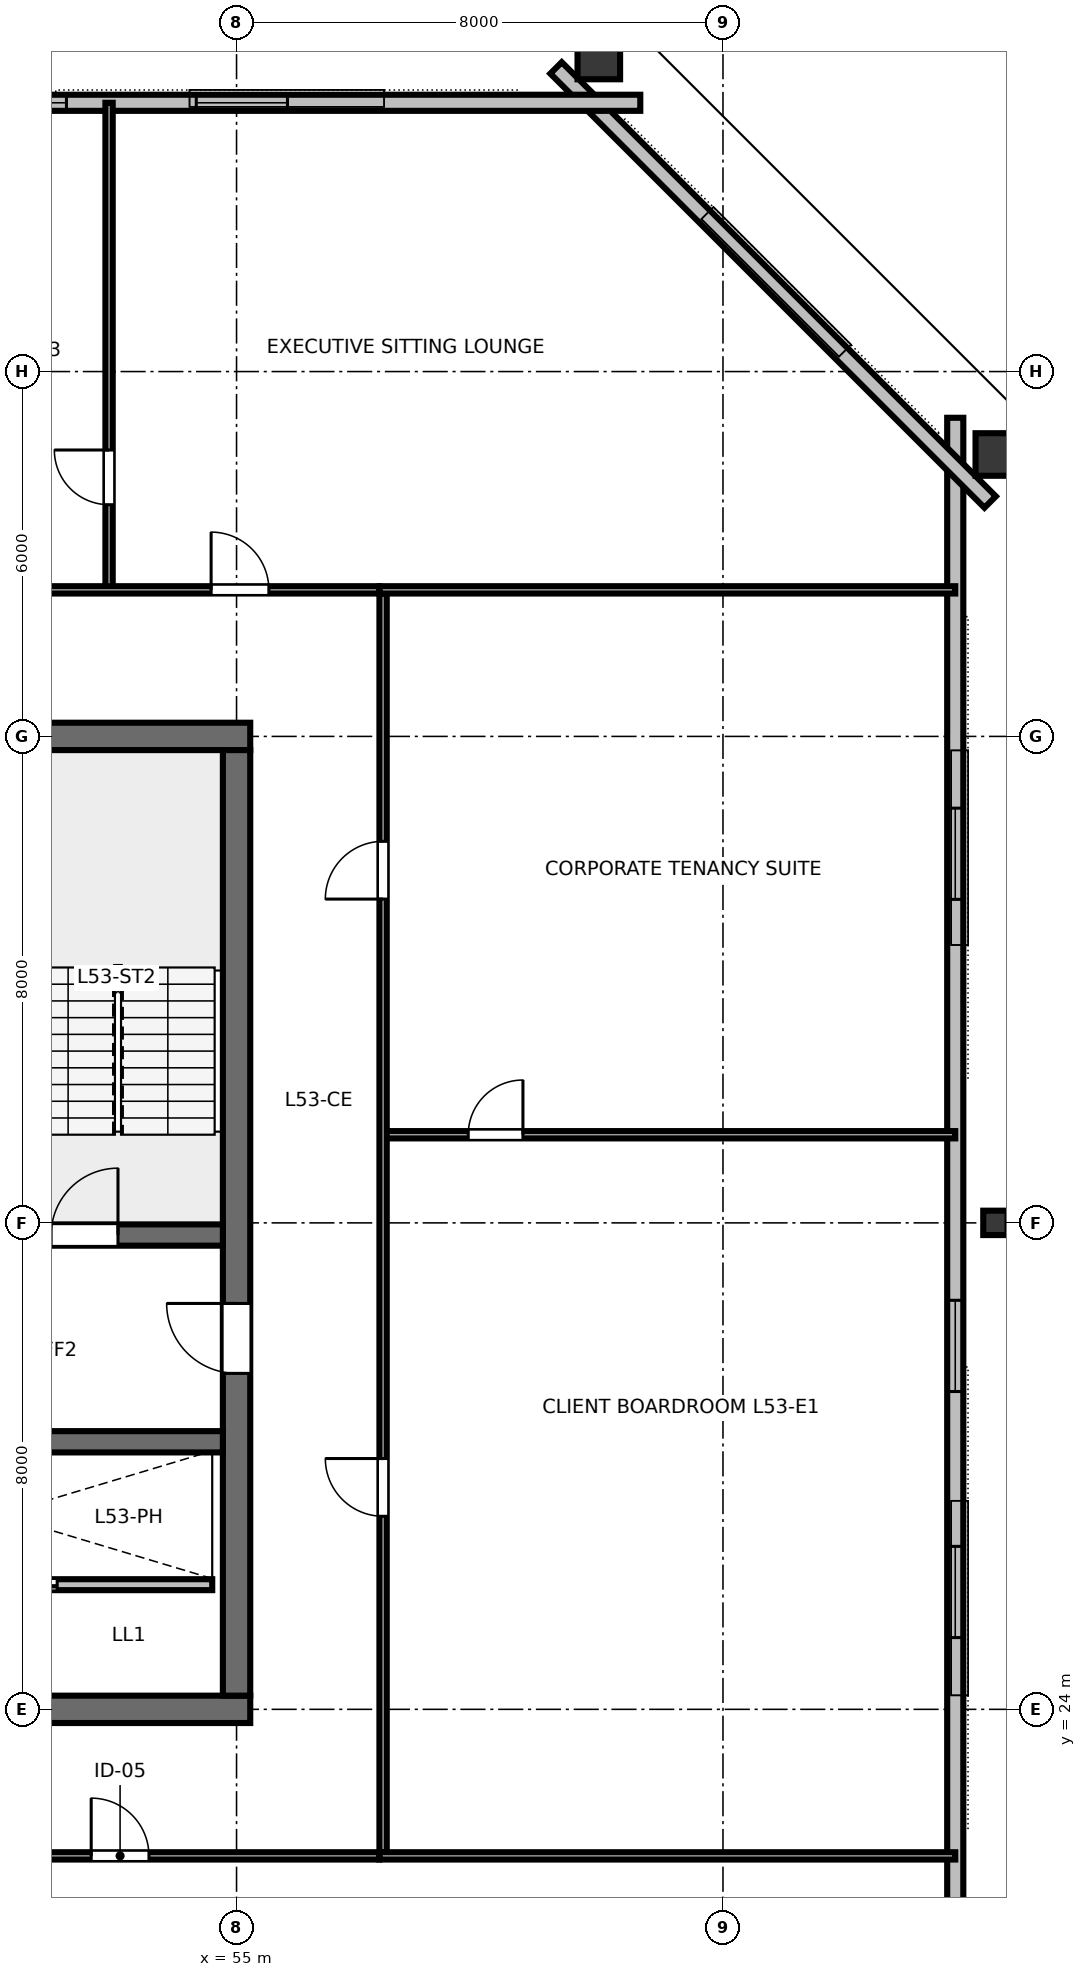
"""IFC4 building model, lengths in metres.
Left out: names, types, materials, properties, quantities, classifications, styles, units other than length and angle.
Written with IfcOpenShell. Run it as: python <this file> out.ifc"""

import sys

from ifc_helpers import new_model, si_unit, direction, frame, frame_2d, origin, origin_2d, place, context, subcontext, project, spatial, rectangle, hollow_rectangle, i_section, extrude, element, fill, save


model = new_model("IFC4")
c1 = context("Model", 3, precision=1e-05, world=origin(), true_north=direction((0.0, 1.0)))
c2 = subcontext(c1, "Body", "Model", "MODEL_VIEW")
j1 = project(units=[si_unit("LENGTHUNIT", "METRE"), si_unit("PLANEANGLEUNIT", "RADIAN")], contexts=[c1])
p1 = place(None, origin())
s1 = spatial("IfcSite", under=j1, at=p1, CompositionType="ELEMENT")
p2 = place(p1, origin())
s2 = spatial("IfcBuilding", under=s1, at=p2, CompositionType="ELEMENT")
p3 = place(p2, frame((0.0, 0.0, 202.2)))
s3 = spatial("IfcBuildingStorey", under=s2, at=p3, CompositionType="ELEMENT", Elevation=202.2)
p4 = place(p3, frame((36.775, 24.0, 0.0), z_axis=(0.0, 0.0, 1.0), x_axis=(1.0, 0.0, 0.0)))
e1 = element("IfcWall", 1, at=p4, inside=s3, PredefinedType="SHEAR", context=c2, shape_type="SweptSolid", body=[
    extrude(rectangle(XDim=18.45, YDim=0.45, at=frame_2d((9.225, 0.0))), origin(), (0.0, 0.0, 1.0), 3.36),
])
p5 = place(p4, frame((13.425, 0.0, 0.0)))
e2 = element("IfcOpeningElement", 2, at=p5, cuts=e1, PredefinedType="OPENING", context=c2, shape_type="SweptSolid", body=[
    extrude(rectangle(XDim=1.6, YDim=2.15, at=frame_2d((0.8, 1.075))), frame((0.0, 0.235, 0.0), z_axis=(0.0, -1.0, 0.0), x_axis=(1.0, 0.0, 0.0)), (0.0, 0.0, 1.0), 0.47),
])
p6 = place(p3, frame((36.775, 40.0, 0.0), z_axis=(0.0, 0.0, 1.0), x_axis=(1.0, 0.0, 0.0)))
e3 = element("IfcWall", 3, at=p6, inside=s3, PredefinedType="SHEAR", context=c2, shape_type="SweptSolid", body=[
    extrude(rectangle(XDim=18.45, YDim=0.45, at=frame_2d((9.225, 0.0))), origin(), (0.0, 0.0, 1.0), 3.36),
])
p7 = place(p6, frame((10.525, 0.0, 0.0)))
e4 = element("IfcOpeningElement", 4, at=p7, cuts=e3, PredefinedType="OPENING", context=c2, shape_type="SweptSolid", body=[
    extrude(rectangle(XDim=1.0, YDim=2.15, at=frame_2d((0.5, 1.075))), frame((0.0, 0.235, 0.0), z_axis=(0.0, -1.0, 0.0), x_axis=(1.0, 0.0, 0.0)), (0.0, 0.0, 1.0), 0.47),
])
p8 = place(p3, frame((55.0, 24.225, 0.0), z_axis=(0.0, 0.0, 1.0), x_axis=(0.0, 1.0, 0.0)))
e5 = element("IfcWall", 5, at=p8, inside=s3, PredefinedType="SHEAR", context=c2, shape_type="SweptSolid", body=[
    extrude(rectangle(XDim=15.55, YDim=0.45, at=frame_2d((7.775, 0.0))), origin(), (0.0, 0.0, 1.0), 3.36),
])
p9 = place(p8, frame((5.3, 0.0, 0.0)))
e6 = element("IfcOpeningElement", 6, at=p9, cuts=e5, PredefinedType="OPENING", context=c2, shape_type="SweptSolid", body=[
    extrude(rectangle(XDim=1.15, YDim=2.15, at=frame_2d((0.575, 1.075))), frame((0.0, 0.235, 0.0), z_axis=(0.0, -1.0, 0.0), x_axis=(1.0, 0.0, 0.0)), (0.0, 0.0, 1.0), 0.47),
])
p10 = place(p3, frame((37.225, 31.8, 0.0), z_axis=(0.0, 0.0, 1.0), x_axis=(1.0, 0.0, 0.0)))
e7 = element("IfcWall", 7, at=p10, inside=s3, PredefinedType="SHEAR", context=c2, shape_type="SweptSolid", body=[
    extrude(rectangle(XDim=17.55, YDim=0.35, at=frame_2d((8.775, 0.0))), origin(), (0.0, 0.0, 1.0), 3.36),
])
p11 = place(p10, frame((0.825, 0.0, 0.0)))
e8 = element("IfcOpeningElement", 8, at=p11, cuts=e7, PredefinedType="OPENING", context=c2, shape_type="SweptSolid", body=[
    extrude(rectangle(XDim=1.1, YDim=2.15, at=frame_2d((0.55, 1.075))), frame((0.0, 0.185, 0.0), z_axis=(0.0, -1.0, 0.0), x_axis=(1.0, 0.0, 0.0)), (0.0, 0.0, 1.0), 0.37),
])
p12 = place(p10, frame((14.725, 0.0, 0.0)))
e9 = element("IfcOpeningElement", 9, at=p12, cuts=e7, PredefinedType="OPENING", context=c2, shape_type="SweptSolid", body=[
    extrude(rectangle(XDim=1.1, YDim=2.15, at=frame_2d((0.55, 1.075))), frame((0.0, 0.185, 0.0), z_axis=(0.0, -1.0, 0.0), x_axis=(1.0, 0.0, 0.0)), (0.0, 0.0, 1.0), 0.37),
])
p13 = place(p3, frame((37.225, 28.4, 0.0), z_axis=(0.0, 0.0, 1.0), x_axis=(1.0, 0.0, 0.0)))
e10 = element("IfcWall", 10, at=p13, inside=s3, PredefinedType="SHEAR", context=c2, shape_type="SweptSolid", body=[
    extrude(rectangle(XDim=17.55, YDim=0.35, at=frame_2d((8.775, 0.0))), origin(), (0.0, 0.0, 1.0), 3.36),
])
p14 = place(p3, frame((67.48, 32.0, 0.0), z_axis=(0.0, 0.0, 1.0), x_axis=(0.0, 1.0, 0.0)))
e11 = element("IfcColumn", 11, at=p14, inside=s3, PredefinedType="COLUMN", context=c2, shape_type="SweptSolid", body=[
    extrude(i_section(OverallWidth=0.401, OverallDepth=0.399, WebThickness=0.025, FlangeThickness=0.04, FilletRadius=0.025, at=origin_2d()), origin(), (0.0, 0.0, 1.0), 3.373),
])
for number, where, z_axis, x_axis in (
    (12, (67.579, 44.636, 0.0), (0.0, 0.0, 1.0), (0.0, 1.0, 0.0)),
    (13, (60.958, 51.232, 0.0), (0.0, 0.0, 1.0), (1.0, 0.0, 0.0)),
):
    element("IfcColumn", number, at=place(p3, frame(where, z_axis=z_axis, x_axis=x_axis)), inside=s3, PredefinedType="COLUMN", context=c2, shape_type="SweptSolid", body=[
        extrude(hollow_rectangle(XDim=0.7, YDim=0.85, WallThickness=0.04, at=origin_2d()), origin(), (0.0, 0.0, 1.0), 3.373),
    ])
p15 = place(p3, frame((66.82, 18.76, 0.0), z_axis=(0.0, 0.0, 1.0), x_axis=(0.0, 1.0, 0.0)))
e14 = element("IfcWall", 14, at=p15, inside=s3, PredefinedType="STANDARD", context=c2, shape_type="SweptSolid", body=[
    extrude(rectangle(XDim=26.48, YDim=0.265, at=frame_2d((13.24, 0.0))), origin(), (0.0, 0.0, 1.0), 3.375),
])
p16 = place(p15, frame((6.42, 0.0, 0.85)))
e15 = element("IfcOpeningElement", 15, at=p16, cuts=e14, PredefinedType="OPENING", context=c2, shape_type="SweptSolid", body=[
    extrude(rectangle(XDim=1.5, YDim=1.85, at=frame_2d((0.75, 0.925))), frame((0.0, 0.142, 0.0), z_axis=(0.0, -1.0, 0.0), x_axis=(1.0, 0.0, 0.0)), (0.0, 0.0, 1.0), 0.285),
])
p17 = place(p15, frame((10.467, 0.0, 0.85)))
e16 = element("IfcOpeningElement", 16, at=p17, cuts=e14, PredefinedType="OPENING", context=c2, shape_type="SweptSolid", body=[
    extrude(rectangle(XDim=1.5, YDim=1.85, at=frame_2d((0.75, 0.925))), frame((0.0, 0.142, 0.0), z_axis=(0.0, -1.0, 0.0), x_axis=(1.0, 0.0, 0.0)), (0.0, 0.0, 1.0), 0.285),
])
p18 = place(p15, frame((18.56, 0.0, 0.85)))
e17 = element("IfcOpeningElement", 17, at=p18, cuts=e14, PredefinedType="OPENING", context=c2, shape_type="SweptSolid", body=[
    extrude(rectangle(XDim=1.5, YDim=1.85, at=frame_2d((0.75, 0.925))), frame((0.0, 0.142, 0.0), z_axis=(0.0, -1.0, 0.0), x_axis=(1.0, 0.0, 0.0)), (0.0, 0.0, 1.0), 0.285),
])
p19 = place(p3, frame((67.394, 43.854, 0.0), z_axis=(0.0, 0.0, 1.0), x_axis=(-0.707106781187, 0.707106781187, 0.0)))
e18 = element("IfcWall", 18, at=p19, inside=s3, PredefinedType="STANDARD", context=c2, shape_type="SweptSolid", body=[
    extrude(rectangle(XDim=10.097, YDim=0.265, at=frame_2d((5.048, 0.0))), origin(), (0.0, 0.0, 1.0), 3.375),
])
p20 = place(p3, frame((61.64, 50.42, 0.0), z_axis=(0.0, 0.0, 1.0), x_axis=(-1.0, 0.0, 0.0)))
e19 = element("IfcWall", 19, at=p20, inside=s3, PredefinedType="STANDARD", context=c2, shape_type="SweptSolid", body=[
    extrude(rectangle(XDim=31.28, YDim=0.265, at=frame_2d((15.64, 0.0))), origin(), (0.0, 0.0, 1.0), 3.375),
])
p21 = place(p20, frame((5.802, 0.0, 0.85)))
e20 = element("IfcOpeningElement", 20, at=p21, cuts=e19, PredefinedType="OPENING", context=c2, shape_type="SweptSolid", body=[
    extrude(rectangle(XDim=1.5, YDim=1.85, at=frame_2d((0.75, 0.925))), frame((0.0, 0.142, 0.0), z_axis=(0.0, -1.0, 0.0), x_axis=(1.0, 0.0, 0.0)), (0.0, 0.0, 1.0), 0.285),
])
p22 = place(p20, frame((9.438, 0.0, 0.85)))
e21 = element("IfcOpeningElement", 21, at=p22, cuts=e19, PredefinedType="OPENING", context=c2, shape_type="SweptSolid", body=[
    extrude(rectangle(XDim=1.5, YDim=1.85, at=frame_2d((0.75, 0.925))), frame((0.0, 0.142, 0.0), z_axis=(0.0, -1.0, 0.0), x_axis=(1.0, 0.0, 0.0)), (0.0, 0.0, 1.0), 0.285),
])
p23 = place(p20, frame((13.073, 0.0, 0.85)))
e22 = element("IfcOpeningElement", 22, at=p23, cuts=e19, PredefinedType="OPENING", context=c2, shape_type="SweptSolid", body=[
    extrude(rectangle(XDim=1.5, YDim=1.85, at=frame_2d((0.75, 0.925))), frame((0.0, 0.142, 0.0), z_axis=(0.0, -1.0, 0.0), x_axis=(1.0, 0.0, 0.0)), (0.0, 0.0, 1.0), 0.285),
])
p24 = place(p20, frame((16.708, 0.0, 0.85)))
e23 = element("IfcOpeningElement", 23, at=p24, cuts=e19, PredefinedType="OPENING", context=c2, shape_type="SweptSolid", body=[
    extrude(rectangle(XDim=1.5, YDim=1.85, at=frame_2d((0.75, 0.925))), frame((0.0, 0.142, 0.0), z_axis=(0.0, -1.0, 0.0), x_axis=(1.0, 0.0, 0.0)), (0.0, 0.0, 1.0), 0.285),
])
p25 = place(p20, frame((23.978, 0.0, 0.85)))
e24 = element("IfcOpeningElement", 24, at=p25, cuts=e19, PredefinedType="OPENING", context=c2, shape_type="SweptSolid", body=[
    extrude(rectangle(XDim=1.5, YDim=1.85, at=frame_2d((0.75, 0.925))), frame((0.0, 0.142, 0.0), z_axis=(0.0, -1.0, 0.0), x_axis=(1.0, 0.0, 0.0)), (0.0, 0.0, 1.0), 0.285),
])
p26 = place(p3, frame((47.6, 26.05, 0.0), z_axis=(0.0, 0.0, 1.0), x_axis=(1.0, 0.0, 0.0)))
e25 = element("IfcWall", 25, at=p26, inside=s3, PredefinedType="PARTITIONING", context=c2, shape_type="SweptSolid", body=[
    extrude(rectangle(XDim=7.0, YDim=0.18, at=frame_2d((3.5, 0.0))), origin(), (0.0, 0.0, 1.0), 3.375),
])
p27 = place(p26, frame((1.2, 0.0, 0.0)))
e26 = element("IfcOpeningElement", 26, at=p27, cuts=e25, PredefinedType="OPENING", context=c2, shape_type="SweptSolid", body=[
    extrude(rectangle(XDim=1.05, YDim=2.15, at=frame_2d((0.525, 1.075))), frame((0.0, 0.1, 0.0), z_axis=(0.0, -1.0, 0.0), x_axis=(1.0, 0.0, 0.0)), (0.0, 0.0, 1.0), 0.2),
])
p28 = place(p26, frame((3.4, 0.0, 0.0)))
e27 = element("IfcOpeningElement", 27, at=p28, cuts=e25, PredefinedType="OPENING", context=c2, shape_type="SweptSolid", body=[
    extrude(rectangle(XDim=1.05, YDim=2.15, at=frame_2d((0.525, 1.075))), frame((0.0, 0.1, 0.0), z_axis=(0.0, -1.0, 0.0), x_axis=(1.0, 0.0, 0.0)), (0.0, 0.0, 1.0), 0.2),
])
p29 = place(p3, frame((47.02, 21.59, 0.0), z_axis=(0.0, 0.0, 1.0), x_axis=(1.0, 0.0, 0.0)))
e28 = element("IfcWall", 28, at=p29, inside=s3, PredefinedType="PARTITIONING", context=c2, shape_type="SweptSolid", body=[
    extrude(rectangle(XDim=10.33, YDim=0.12, at=frame_2d((5.165, 0.0))), origin(), (0.0, 0.0, 1.0), 2.655),
])
p30 = place(p29, frame((5.59, 0.0, 0.0)))
e29 = element("IfcOpeningElement", 29, at=p30, cuts=e28, PredefinedType="OPENING", context=c2, shape_type="SweptSolid", body=[
    extrude(rectangle(XDim=0.95, YDim=2.15, at=frame_2d((0.475, 1.075))), frame((0.0, 0.07, 0.0), z_axis=(0.0, -1.0, 0.0), x_axis=(1.0, 0.0, 0.0)), (0.0, 0.0, 1.0), 0.14),
])
p31 = place(p3, frame((52.903, 42.41, 0.0), z_axis=(0.0, 0.0, 1.0), x_axis=(0.0, 1.0, 0.0)))
e30 = element("IfcWall", 30, at=p31, inside=s3, PredefinedType="PARTITIONING", context=c2, shape_type="SweptSolid", body=[
    extrude(rectangle(XDim=8.01, YDim=0.12, at=frame_2d((4.005, 0.0))), origin(), (0.0, 0.0, 1.0), 2.655),
])
p32 = place(p31, frame((1.4, 0.0, 0.0)))
e31 = element("IfcOpeningElement", 31, at=p32, cuts=e30, PredefinedType="OPENING", context=c2, shape_type="SweptSolid", body=[
    extrude(rectangle(XDim=0.9, YDim=2.15, at=frame_2d((0.45, 1.075))), frame((0.0, 0.07, 0.0), z_axis=(0.0, -1.0, 0.0), x_axis=(1.0, 0.0, 0.0)), (0.0, 0.0, 1.0), 0.14),
])
p33 = place(p3, frame((47.02, 42.41, 0.0), z_axis=(0.0, 0.0, 1.0), x_axis=(1.0, 0.0, 0.0)))
e32 = element("IfcWall", 32, at=p33, inside=s3, PredefinedType="PARTITIONING", context=c2, shape_type="SweptSolid", body=[
    extrude(rectangle(XDim=10.33, YDim=0.12, at=frame_2d((5.165, 0.0))), origin(), (0.0, 0.0, 1.0), 2.655),
])
p34 = place(p33, frame((2.467, 0.0, 0.0)))
e33 = element("IfcOpeningElement", 33, at=p34, cuts=e32, PredefinedType="OPENING", context=c2, shape_type="SweptSolid", body=[
    extrude(rectangle(XDim=0.95, YDim=2.15, at=frame_2d((0.475, 1.075))), frame((0.0, 0.07, 0.0), z_axis=(0.0, -1.0, 0.0), x_axis=(1.0, 0.0, 0.0)), (0.0, 0.0, 1.0), 0.14),
])
p35 = place(p33, frame((7.562, 0.0, 0.0)))
e34 = element("IfcOpeningElement", 34, at=p35, cuts=e32, PredefinedType="OPENING", context=c2, shape_type="SweptSolid", body=[
    extrude(rectangle(XDim=0.95, YDim=2.15, at=frame_2d((0.475, 1.075))), frame((0.0, 0.07, 0.0), z_axis=(0.0, -1.0, 0.0), x_axis=(1.0, 0.0, 0.0)), (0.0, 0.0, 1.0), 0.14),
])
p36 = place(p3, frame((57.41, 33.449, 0.0), z_axis=(0.0, 0.0, 1.0), x_axis=(1.0, 0.0, 0.0)))
e35 = element("IfcWall", 35, at=p36, inside=s3, PredefinedType="PARTITIONING", context=c2, shape_type="SweptSolid", body=[
    extrude(rectangle(XDim=9.41, YDim=0.12, at=frame_2d((4.705, 0.0))), origin(), (0.0, 0.0, 1.0), 2.655),
])
p37 = place(p36, frame((1.4, 0.0, 0.0)))
e36 = element("IfcOpeningElement", 36, at=p37, cuts=e35, PredefinedType="OPENING", context=c2, shape_type="SweptSolid", body=[
    extrude(rectangle(XDim=0.9, YDim=2.15, at=frame_2d((0.45, 1.075))), frame((0.0, 0.07, 0.0), z_axis=(0.0, -1.0, 0.0), x_axis=(1.0, 0.0, 0.0)), (0.0, 0.0, 1.0), 0.14),
])
p38 = place(p3, frame((57.41, 21.65, 0.0), z_axis=(0.0, 0.0, 1.0), x_axis=(0.0, 1.0, 0.0)))
e37 = element("IfcWall", 37, at=p38, inside=s3, PredefinedType="PARTITIONING", context=c2, shape_type="SweptSolid", body=[
    extrude(rectangle(XDim=20.7, YDim=0.12, at=frame_2d((10.35, 0.0))), origin(), (0.0, 0.0, 1.0), 2.655),
])
p39 = place(p38, frame((5.525, 0.0, 0.0)))
e38 = element("IfcOpeningElement", 38, at=p39, cuts=e37, PredefinedType="OPENING", context=c2, shape_type="SweptSolid", body=[
    extrude(rectangle(XDim=0.95, YDim=2.15, at=frame_2d((0.475, 1.075))), frame((0.0, 0.07, 0.0), z_axis=(0.0, -1.0, 0.0), x_axis=(1.0, 0.0, 0.0)), (0.0, 0.0, 1.0), 0.14),
])
p40 = place(p38, frame((15.675, 0.0, 0.0)))
e39 = element("IfcOpeningElement", 39, at=p40, cuts=e37, PredefinedType="OPENING", context=c2, shape_type="SweptSolid", body=[
    extrude(rectangle(XDim=0.95, YDim=2.15, at=frame_2d((0.475, 1.075))), frame((0.0, 0.07, 0.0), z_axis=(0.0, -1.0, 0.0), x_axis=(1.0, 0.0, 0.0)), (0.0, 0.0, 1.0), 0.14),
])
for number, where, z_axis, x_axis in (
    (40, (57.35, 21.59, 0.0), (0.0, 0.0, 1.0), (1.0, 0.0, 0.0)),
    (41, (57.35, 42.41, 0.0), (0.0, 0.0, 1.0), (1.0, 0.0, 0.0)),
):
    element("IfcWall", number, at=place(p3, frame(where, z_axis=z_axis, x_axis=x_axis)), inside=s3, PredefinedType="PARTITIONING", context=c2, shape_type="SweptSolid", body=[
        extrude(rectangle(XDim=9.47, YDim=0.12, at=frame_2d((4.735, 0.0))), origin(), (0.0, 0.0, 1.0), 2.655),
    ])
p41 = place(p16, origin())
e42 = element("IfcWindow", 42, at=p41, inside=s3, PartitioningType="SINGLE_PANEL", PredefinedType="WINDOW", context=c2, shape_type="SweptSolid", body=[
    extrude(rectangle(XDim=1.5, YDim=1.85, at=frame_2d((0.75, 0.925))), frame((0.0, 0.03, 0.0), z_axis=(0.0, -1.0, 0.0), x_axis=(1.0, 0.0, 0.0)), (0.0, 0.0, 1.0), 0.06),
])
fill(e15, e42)
p42 = place(p17, origin())
e43 = element("IfcWindow", 43, at=p42, inside=s3, PartitioningType="SINGLE_PANEL", PredefinedType="WINDOW", context=c2, shape_type="SweptSolid", body=[
    extrude(rectangle(XDim=1.5, YDim=1.85, at=frame_2d((0.75, 0.925))), frame((0.0, 0.03, 0.0), z_axis=(0.0, -1.0, 0.0), x_axis=(1.0, 0.0, 0.0)), (0.0, 0.0, 1.0), 0.06),
])
fill(e16, e43)
p43 = place(p18, origin())
e44 = element("IfcWindow", 44, at=p43, inside=s3, PartitioningType="SINGLE_PANEL", PredefinedType="WINDOW", context=c2, shape_type="SweptSolid", body=[
    extrude(rectangle(XDim=1.5, YDim=1.85, at=frame_2d((0.75, 0.925))), frame((0.0, 0.03, 0.0), z_axis=(0.0, -1.0, 0.0), x_axis=(1.0, 0.0, 0.0)), (0.0, 0.0, 1.0), 0.06),
])
fill(e17, e44)
p44 = place(p21, origin())
e45 = element("IfcWindow", 45, at=p44, inside=s3, PartitioningType="SINGLE_PANEL", PredefinedType="WINDOW", context=c2, shape_type="SweptSolid", body=[
    extrude(rectangle(XDim=1.5, YDim=1.85, at=frame_2d((0.75, 0.925))), frame((0.0, 0.03, 0.0), z_axis=(0.0, -1.0, 0.0), x_axis=(1.0, 0.0, 0.0)), (0.0, 0.0, 1.0), 0.06),
])
fill(e20, e45)
p45 = place(p22, origin())
e46 = element("IfcWindow", 46, at=p45, inside=s3, PartitioningType="SINGLE_PANEL", PredefinedType="WINDOW", context=c2, shape_type="SweptSolid", body=[
    extrude(rectangle(XDim=1.5, YDim=1.85, at=frame_2d((0.75, 0.925))), frame((0.0, 0.03, 0.0), z_axis=(0.0, -1.0, 0.0), x_axis=(1.0, 0.0, 0.0)), (0.0, 0.0, 1.0), 0.06),
])
fill(e21, e46)
p46 = place(p12, origin())
e47 = element("IfcDoor", 47, at=p46, inside=s3, OperationType="SINGLE_SWING_RIGHT", PredefinedType="DOOR", context=c2, shape_type="SweptSolid", body=[
    extrude(rectangle(XDim=1.1, YDim=2.15, at=frame_2d((0.55, 1.075))), frame((0.0, 0.025, 0.0), z_axis=(0.0, -1.0, 0.0), x_axis=(1.0, 0.0, 0.0)), (0.0, 0.0, 1.0), 0.05),
])
fill(e9, e47)
p47 = place(p9, origin())
e48 = element("IfcDoor", 48, at=p47, inside=s3, OperationType="SINGLE_SWING_RIGHT", PredefinedType="DOOR", context=c2, shape_type="SweptSolid", body=[
    extrude(rectangle(XDim=1.15, YDim=2.15, at=frame_2d((0.575, 1.075))), frame((0.0, 0.025, 0.0), z_axis=(0.0, -1.0, 0.0), x_axis=(1.0, 0.0, 0.0)), (0.0, 0.0, 1.0), 0.05),
])
fill(e6, e48)
p48 = place(p28, origin())
e49 = element("IfcDoor", 49, at=p48, inside=s3, OperationType="SLIDING_TO_RIGHT", PredefinedType="DOOR", context=c2, shape_type="SweptSolid", body=[
    extrude(rectangle(XDim=1.05, YDim=2.15, at=frame_2d((0.525, 1.075))), frame((0.0, 0.025, 0.0), z_axis=(0.0, -1.0, 0.0), x_axis=(1.0, 0.0, 0.0)), (0.0, 0.0, 1.0), 0.05),
])
fill(e27, e49)
p49 = place(p30, origin())
e50 = element("IfcDoor", 50, at=p49, inside=s3, OperationType="SINGLE_SWING_LEFT", PredefinedType="DOOR", context=c2, shape_type="SweptSolid", body=[
    extrude(rectangle(XDim=0.95, YDim=2.15, at=frame_2d((0.475, 1.075))), frame((0.0, 0.025, 0.0), z_axis=(0.0, -1.0, 0.0), x_axis=(1.0, 0.0, 0.0)), (0.0, 0.0, 1.0), 0.05),
])
fill(e29, e50)
p50 = place(p32, origin())
e51 = element("IfcDoor", 51, at=p50, inside=s3, OperationType="SINGLE_SWING_RIGHT", PredefinedType="DOOR", context=c2, shape_type="SweptSolid", body=[
    extrude(rectangle(XDim=0.9, YDim=2.15, at=frame_2d((0.45, 1.075))), frame((0.0, 0.025, 0.0), z_axis=(0.0, -1.0, 0.0), x_axis=(1.0, 0.0, 0.0)), (0.0, 0.0, 1.0), 0.05),
])
fill(e31, e51)
p51 = place(p35, origin())
e52 = element("IfcDoor", 52, at=p51, inside=s3, OperationType="SINGLE_SWING_LEFT", PredefinedType="DOOR", context=c2, shape_type="SweptSolid", body=[
    extrude(rectangle(XDim=0.95, YDim=2.15, at=frame_2d((0.475, 1.075))), frame((0.0, 0.025, 0.0), z_axis=(0.0, -1.0, 0.0), x_axis=(1.0, 0.0, 0.0)), (0.0, 0.0, 1.0), 0.05),
])
fill(e34, e52)
p52 = place(p37, origin())
e53 = element("IfcDoor", 53, at=p52, inside=s3, OperationType="SINGLE_SWING_RIGHT", PredefinedType="DOOR", context=c2, shape_type="SweptSolid", body=[
    extrude(rectangle(XDim=0.9, YDim=2.15, at=frame_2d((0.45, 1.075))), frame((0.0, 0.025, 0.0), z_axis=(0.0, -1.0, 0.0), x_axis=(1.0, 0.0, 0.0)), (0.0, 0.0, 1.0), 0.05),
])
fill(e36, e53)
p53 = place(p39, origin())
e54 = element("IfcDoor", 54, at=p53, inside=s3, OperationType="SINGLE_SWING_RIGHT", PredefinedType="DOOR", context=c2, shape_type="SweptSolid", body=[
    extrude(rectangle(XDim=0.95, YDim=2.15, at=frame_2d((0.475, 1.075))), frame((0.0, 0.025, 0.0), z_axis=(0.0, -1.0, 0.0), x_axis=(1.0, 0.0, 0.0)), (0.0, 0.0, 1.0), 0.05),
])
fill(e38, e54)
p54 = place(p40, origin())
e55 = element("IfcDoor", 55, at=p54, inside=s3, OperationType="SINGLE_SWING_LEFT", PredefinedType="DOOR", context=c2, shape_type="SweptSolid", body=[
    extrude(rectangle(XDim=0.95, YDim=2.15, at=frame_2d((0.475, 1.075))), frame((0.0, 0.025, 0.0), z_axis=(0.0, -1.0, 0.0), x_axis=(1.0, 0.0, 0.0)), (0.0, 0.0, 1.0), 0.05),
])
fill(e39, e55)
save(model, sys.argv[1])
